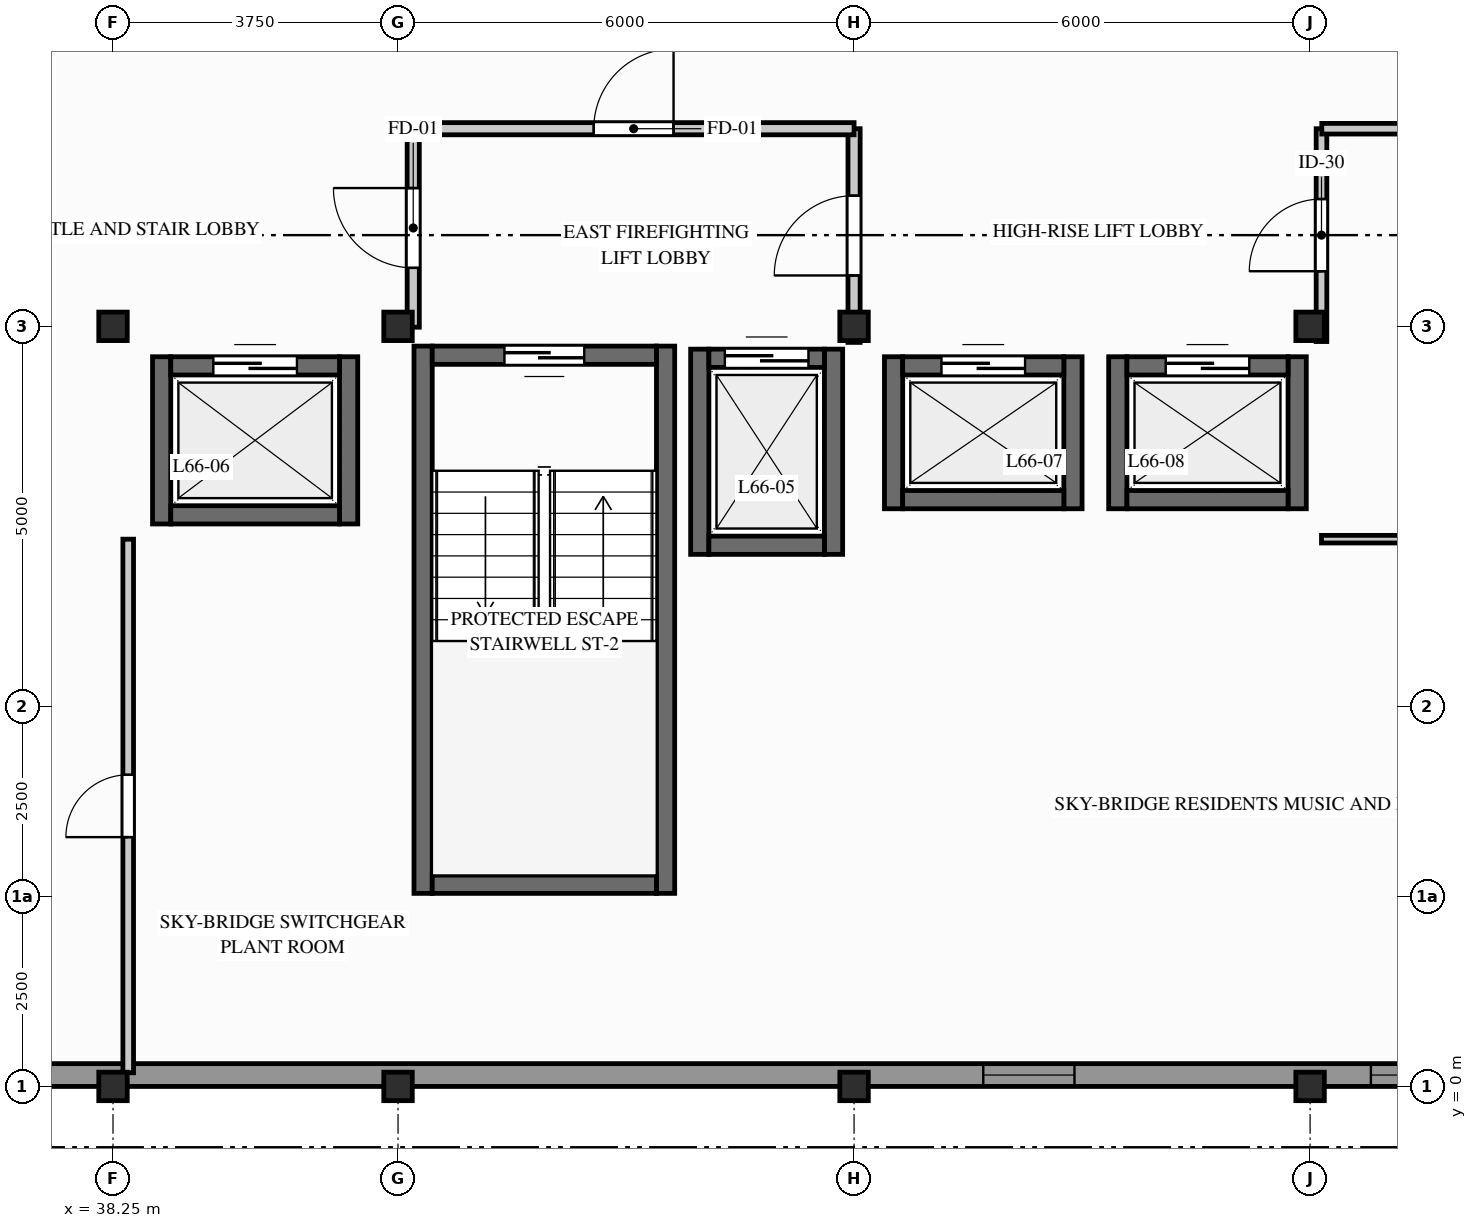
"""IFC4 building model, lengths in metres.
Left out: names, types, materials, properties, quantities, classifications, styles, units other than length and angle.
Written with IfcOpenShell. Run it as: python <this file> out.ifc"""

import sys

from ifc_helpers import new_model, si_unit, direction, frame, frame_2d, origin, origin_2d, place, context, subcontext, project, spatial, rectangle, i_section, extrude, element, fill, save


model = new_model("IFC4")
c1 = context("Model", 3, precision=1e-05, world=origin(), true_north=direction((0.0, 1.0)))
c2 = subcontext(c1, "Body", "Model", "MODEL_VIEW")
j1 = project(units=[si_unit("LENGTHUNIT", "METRE"), si_unit("PLANEANGLEUNIT", "RADIAN")], contexts=[c1])
p1 = place(None, origin())
s1 = spatial("IfcSite", under=j1, at=p1, CompositionType="ELEMENT")
p2 = place(p1, origin())
s2 = spatial("IfcBuilding", under=s1, at=p2, CompositionType="ELEMENT")
p3 = place(p2, frame((0.0, 0.0, 218.0)))
s3 = spatial("IfcBuildingStorey", under=s2, at=p3, CompositionType="ELEMENT", Elevation=218.0)
for number, where, z_axis, x_axis in (
    (1, (38.25, 0.0, 0.0), (0.0, 0.0, 1.0), (1.0, 0.0, 0.0)),
    (2, (38.25, 10.0, 0.0), (0.0, 0.0, 1.0), (1.0, 0.0, 0.0)),
    (3, (42.0, 0.0, 0.0), (0.0, 0.0, 1.0), (1.0, 0.0, 0.0)),
    (4, (42.0, 10.0, 0.0), (0.0, 0.0, 1.0), (1.0, 0.0, 0.0)),
    (5, (48.0, 0.0, 0.0), (0.0, 0.0, 1.0), (1.0, 0.0, 0.0)),
    (6, (48.0, 10.0, 0.0), (0.0, 0.0, 1.0), (1.0, 0.0, 0.0)),
    (7, (54.0, 0.0, 0.0), (0.0, 0.0, 1.0), (1.0, 0.0, 0.0)),
    (8, (54.0, 10.0, 0.0), (0.0, 0.0, 1.0), (1.0, 0.0, 0.0)),
):
    element("IfcColumn", number, at=place(p3, frame(where, z_axis=z_axis, x_axis=x_axis)), inside=s3, PredefinedType="COLUMN", context=c2, shape_type="SweptSolid", body=[
        extrude(i_section(OverallWidth=0.375, OverallDepth=0.375, WebThickness=0.017, FlangeThickness=0.027, FilletRadius=0.015, at=origin_2d()), origin(), (0.0, 0.0, 1.0), 3.1),
    ])
p4 = place(p3, frame((2.5, 0.15, 0.0), z_axis=(0.0, 0.0, 1.0), x_axis=(1.0, 0.0, 0.0)))
e9 = element("IfcWall", 9, at=p4, inside=s3, PredefinedType="STANDARD", context=c2, shape_type="SweptSolid", body=[
    extrude(rectangle(XDim=55.0, YDim=0.3, at=frame_2d((27.5, 0.0))), origin(), (0.0, 0.0, 1.0), 2.332),
])
p5 = place(p4, frame((1.0, 0.0, 0.312)))
e10 = element("IfcOpeningElement", 10, at=p5, cuts=e9, PredefinedType="OPENING", context=c2, shape_type="SweptSolid", body=[
    extrude(rectangle(XDim=1.5, YDim=1.8, at=frame_2d((0.75, 0.9))), frame((0.0, 0.16, 0.0), z_axis=(0.0, -1.0, 0.0), x_axis=(1.0, 0.0, 0.0)), (0.0, 0.0, 1.0), 0.32),
])
p6 = place(p4, frame((24.5, 0.0, 1.15)))
e11 = element("IfcOpeningElement", 11, at=p6, cuts=e9, PredefinedType="OPENING", context=c2, shape_type="SweptSolid", body=[
    extrude(rectangle(XDim=0.9, YDim=0.9, at=frame_2d((0.45, 0.45))), frame((0.0, 0.16, 0.0), z_axis=(0.0, -1.0, 0.0), x_axis=(1.0, 0.0, 0.0)), (0.0, 0.0, 1.0), 0.32),
])
p7 = place(p4, frame((47.2, 0.0, 0.512)))
e12 = element("IfcOpeningElement", 12, at=p7, cuts=e9, PredefinedType="OPENING", context=c2, shape_type="SweptSolid", body=[
    extrude(rectangle(XDim=1.2, YDim=1.6, at=frame_2d((0.6, 0.8))), frame((0.0, 0.16, 0.0), z_axis=(0.0, -1.0, 0.0), x_axis=(1.0, 0.0, 0.0)), (0.0, 0.0, 1.0), 0.32),
])
p8 = place(p4, frame((52.3, 0.0, 0.512)))
e13 = element("IfcOpeningElement", 13, at=p8, cuts=e9, PredefinedType="OPENING", context=c2, shape_type="SweptSolid", body=[
    extrude(rectangle(XDim=1.2, YDim=1.6, at=frame_2d((0.6, 0.8))), frame((0.0, 0.16, 0.0), z_axis=(0.0, -1.0, 0.0), x_axis=(1.0, 0.0, 0.0)), (0.0, 0.0, 1.0), 0.32),
])
for number, where, z_axis, x_axis in (
    (14, (42.33, 2.54, 0.0), (0.0, 0.0, 1.0), (0.0, 1.0, 0.0)),
    (15, (45.52, 2.54, 0.0), (0.0, 0.0, 1.0), (0.0, 1.0, 0.0)),
):
    element("IfcWall", number, at=place(p3, frame(where, z_axis=z_axis, x_axis=x_axis)), inside=s3, PredefinedType="SHEAR", context=c2, shape_type="SweptSolid", body=[
        extrude(rectangle(XDim=7.2, YDim=0.24, at=frame_2d((3.6, 0.0))), origin(), (0.0, 0.0, 1.0), 2.89),
    ])
p9 = place(p3, frame((42.45, 2.66, 0.0), z_axis=(0.0, 0.0, 1.0), x_axis=(1.0, 0.0, 0.0)))
e16 = element("IfcWall", 16, at=p9, inside=s3, PredefinedType="SHEAR", context=c2, shape_type="SweptSolid", body=[
    extrude(rectangle(XDim=2.95, YDim=0.24, at=frame_2d((1.475, 0.0))), origin(), (0.0, 0.0, 1.0), 2.89),
])
p10 = place(p3, frame((45.4, 9.62, 0.0), z_axis=(0.0, 0.0, 1.0), x_axis=(-1.0, 0.0, 0.0)))
e17 = element("IfcWall", 17, at=p10, inside=s3, PredefinedType="SHEAR", context=c2, shape_type="SweptSolid", body=[
    extrude(rectangle(XDim=2.95, YDim=0.24, at=frame_2d((1.475, 0.0))), origin(), (0.0, 0.0, 1.0), 2.89),
])
p11 = place(p10, frame((0.95, 0.0, 0.0)))
e18 = element("IfcOpeningElement", 18, at=p11, cuts=e17, PredefinedType="OPENING", context=c2, shape_type="SweptSolid", body=[
    extrude(rectangle(XDim=1.05, YDim=2.06, at=frame_2d((0.525, 1.03))), frame((0.0, 0.13, 0.0), z_axis=(0.0, -1.0, 0.0), x_axis=(1.0, 0.0, 0.0)), (0.0, 0.0, 1.0), 0.26),
])
for number, where, z_axis, x_axis in (
    (19, (45.97, 7.0, 0.0), (0.0, 0.0, 1.0), (0.0, 1.0, 0.0)),
    (20, (47.73, 7.0, 0.0), (0.0, 0.0, 1.0), (0.0, 1.0, 0.0)),
):
    element("IfcWall", number, at=place(p3, frame(where, z_axis=z_axis, x_axis=x_axis)), inside=s3, PredefinedType="SHEAR", context=c2, shape_type="SweptSolid", body=[
        extrude(rectangle(XDim=2.7, YDim=0.24, at=frame_2d((1.35, 0.0))), origin(), (0.0, 0.0, 1.0), 2.89),
    ])
p12 = place(p3, frame((46.09, 7.12, 0.0), z_axis=(0.0, 0.0, 1.0), x_axis=(1.0, 0.0, 0.0)))
e21 = element("IfcWall", 21, at=p12, inside=s3, PredefinedType="SHEAR", context=c2, shape_type="SweptSolid", body=[
    extrude(rectangle(XDim=1.52, YDim=0.24, at=frame_2d((0.76, 0.0))), origin(), (0.0, 0.0, 1.0), 2.89),
])
p13 = place(p3, frame((46.09, 9.58, 0.0), z_axis=(0.0, 0.0, 1.0), x_axis=(1.0, 0.0, 0.0)))
e22 = element("IfcWall", 22, at=p13, inside=s3, PredefinedType="SHEAR", context=c2, shape_type="SweptSolid", body=[
    extrude(rectangle(XDim=1.52, YDim=0.24, at=frame_2d((0.76, 0.0))), origin(), (0.0, 0.0, 1.0), 2.89),
])
p14 = place(p13, frame((0.21, 0.0, 0.0)))
e23 = element("IfcOpeningElement", 23, at=p14, cuts=e22, PredefinedType="OPENING", context=c2, shape_type="SweptSolid", body=[
    extrude(rectangle(XDim=1.1, YDim=2.06, at=frame_2d((0.55, 1.03))), frame((0.0, 0.13, 0.0), z_axis=(0.0, -1.0, 0.0), x_axis=(1.0, 0.0, 0.0)), (0.0, 0.0, 1.0), 0.26),
])
for number, where, z_axis, x_axis in (
    (24, (38.89, 7.4, 0.0), (0.0, 0.0, 1.0), (0.0, 1.0, 0.0)),
    (25, (41.35, 7.4, 0.0), (0.0, 0.0, 1.0), (0.0, 1.0, 0.0)),
):
    element("IfcWall", number, at=place(p3, frame(where, z_axis=z_axis, x_axis=x_axis)), inside=s3, PredefinedType="SHEAR", context=c2, shape_type="SweptSolid", body=[
        extrude(rectangle(XDim=2.2, YDim=0.24, at=frame_2d((1.1, 0.0))), origin(), (0.0, 0.0, 1.0), 2.89),
    ])
p15 = place(p3, frame((39.01, 7.52, 0.0), z_axis=(0.0, 0.0, 1.0), x_axis=(1.0, 0.0, 0.0)))
e26 = element("IfcWall", 26, at=p15, inside=s3, PredefinedType="SHEAR", context=c2, shape_type="SweptSolid", body=[
    extrude(rectangle(XDim=2.22, YDim=0.24, at=frame_2d((1.11, 0.0))), origin(), (0.0, 0.0, 1.0), 2.89),
])
p16 = place(p3, frame((39.01, 9.48, 0.0), z_axis=(0.0, 0.0, 1.0), x_axis=(1.0, 0.0, 0.0)))
e27 = element("IfcWall", 27, at=p16, inside=s3, PredefinedType="SHEAR", context=c2, shape_type="SweptSolid", body=[
    extrude(rectangle(XDim=2.22, YDim=0.24, at=frame_2d((1.11, 0.0))), origin(), (0.0, 0.0, 1.0), 2.89),
])
p17 = place(p16, frame((0.56, 0.0, 0.0)))
e28 = element("IfcOpeningElement", 28, at=p17, cuts=e27, PredefinedType="OPENING", context=c2, shape_type="SweptSolid", body=[
    extrude(rectangle(XDim=1.1, YDim=2.06, at=frame_2d((0.55, 1.03))), frame((0.0, 0.13, 0.0), z_axis=(0.0, -1.0, 0.0), x_axis=(1.0, 0.0, 0.0)), (0.0, 0.0, 1.0), 0.26),
])
for number, where, z_axis, x_axis in (
    (29, (48.52, 7.6, 0.0), (0.0, 0.0, 1.0), (0.0, 1.0, 0.0)),
    (30, (50.88, 7.6, 0.0), (0.0, 0.0, 1.0), (0.0, 1.0, 0.0)),
):
    element("IfcWall", number, at=place(p3, frame(where, z_axis=z_axis, x_axis=x_axis)), inside=s3, PredefinedType="SHEAR", context=c2, shape_type="SweptSolid", body=[
        extrude(rectangle(XDim=2.0, YDim=0.24, at=frame_2d((1.0, 0.0))), origin(), (0.0, 0.0, 1.0), 2.89),
    ])
p18 = place(p3, frame((48.64, 7.72, 0.0), z_axis=(0.0, 0.0, 1.0), x_axis=(1.0, 0.0, 0.0)))
e31 = element("IfcWall", 31, at=p18, inside=s3, PredefinedType="SHEAR", context=c2, shape_type="SweptSolid", body=[
    extrude(rectangle(XDim=2.12, YDim=0.24, at=frame_2d((1.06, 0.0))), origin(), (0.0, 0.0, 1.0), 2.89),
])
p19 = place(p3, frame((48.64, 9.48, 0.0), z_axis=(0.0, 0.0, 1.0), x_axis=(1.0, 0.0, 0.0)))
e32 = element("IfcWall", 32, at=p19, inside=s3, PredefinedType="SHEAR", context=c2, shape_type="SweptSolid", body=[
    extrude(rectangle(XDim=2.12, YDim=0.24, at=frame_2d((1.06, 0.0))), origin(), (0.0, 0.0, 1.0), 2.89),
])
p20 = place(p19, frame((0.51, 0.0, 0.0)))
e33 = element("IfcOpeningElement", 33, at=p20, cuts=e32, PredefinedType="OPENING", context=c2, shape_type="SweptSolid", body=[
    extrude(rectangle(XDim=1.1, YDim=2.06, at=frame_2d((0.55, 1.03))), frame((0.0, 0.13, 0.0), z_axis=(0.0, -1.0, 0.0), x_axis=(1.0, 0.0, 0.0)), (0.0, 0.0, 1.0), 0.26),
])
for number, where, z_axis, x_axis in (
    (34, (51.47, 7.6, 0.0), (0.0, 0.0, 1.0), (0.0, 1.0, 0.0)),
    (35, (53.83, 7.6, 0.0), (0.0, 0.0, 1.0), (0.0, 1.0, 0.0)),
):
    element("IfcWall", number, at=place(p3, frame(where, z_axis=z_axis, x_axis=x_axis)), inside=s3, PredefinedType="SHEAR", context=c2, shape_type="SweptSolid", body=[
        extrude(rectangle(XDim=2.0, YDim=0.24, at=frame_2d((1.0, 0.0))), origin(), (0.0, 0.0, 1.0), 2.89),
    ])
p21 = place(p3, frame((51.59, 7.72, 0.0), z_axis=(0.0, 0.0, 1.0), x_axis=(1.0, 0.0, 0.0)))
e36 = element("IfcWall", 36, at=p21, inside=s3, PredefinedType="SHEAR", context=c2, shape_type="SweptSolid", body=[
    extrude(rectangle(XDim=2.12, YDim=0.24, at=frame_2d((1.06, 0.0))), origin(), (0.0, 0.0, 1.0), 2.89),
])
p22 = place(p3, frame((51.59, 9.48, 0.0), z_axis=(0.0, 0.0, 1.0), x_axis=(1.0, 0.0, 0.0)))
e37 = element("IfcWall", 37, at=p22, inside=s3, PredefinedType="SHEAR", context=c2, shape_type="SweptSolid", body=[
    extrude(rectangle(XDim=2.12, YDim=0.24, at=frame_2d((1.06, 0.0))), origin(), (0.0, 0.0, 1.0), 2.89),
])
p23 = place(p22, frame((0.51, 0.0, 0.0)))
e38 = element("IfcOpeningElement", 38, at=p23, cuts=e37, PredefinedType="OPENING", context=c2, shape_type="SweptSolid", body=[
    extrude(rectangle(XDim=1.1, YDim=2.06, at=frame_2d((0.55, 1.03))), frame((0.0, 0.13, 0.0), z_axis=(0.0, -1.0, 0.0), x_axis=(1.0, 0.0, 0.0)), (0.0, 0.0, 1.0), 0.26),
])
p24 = place(p3, frame((38.45, 0.18, 0.0), z_axis=(0.0, 0.0, 1.0), x_axis=(0.0, 1.0, 0.0)))
e39 = element("IfcWall", 39, at=p24, inside=s3, PredefinedType="PARTITIONING", context=c2, shape_type="SweptSolid", body=[
    extrude(rectangle(XDim=7.02, YDim=0.14, at=frame_2d((3.51, 0.0))), origin(), (0.0, 0.0, 1.0), 2.325),
])
p25 = place(p24, frame((3.1, 0.0, 0.0)))
e40 = element("IfcOpeningElement", 40, at=p25, cuts=e39, PredefinedType="OPENING", context=c2, shape_type="SweptSolid", body=[
    extrude(rectangle(XDim=0.82, YDim=2.02, at=frame_2d((0.41, 1.01))), frame((0.0, 0.08, 0.0), z_axis=(0.0, -1.0, 0.0), x_axis=(1.0, 0.0, 0.0)), (0.0, 0.0, 1.0), 0.16),
])
p26 = place(p3, frame((42.2, 9.989, 0.0), z_axis=(0.0, 0.0, 1.0), x_axis=(0.0, 1.0, 0.0)))
e41 = element("IfcWall", 41, at=p26, inside=s3, PredefinedType="PARTITIONING", context=c2, shape_type="SweptSolid", body=[
    extrude(rectangle(XDim=2.611, YDim=0.16, at=frame_2d((1.306, 0.0))), origin(), (0.0, 0.0, 1.0), 2.325),
])
p27 = place(p26, frame((0.781, 0.0, 0.0)))
e42 = element("IfcOpeningElement", 42, at=p27, cuts=e41, PredefinedType="OPENING", context=c2, shape_type="SweptSolid", body=[
    extrude(rectangle(XDim=1.05, YDim=2.06, at=frame_2d((0.525, 1.03))), frame((0.0, 0.09, 0.0), z_axis=(0.0, -1.0, 0.0), x_axis=(1.0, 0.0, 0.0)), (0.0, 0.0, 1.0), 0.18),
])
p28 = place(p3, frame((48.0, 9.789, 0.0), z_axis=(0.0, 0.0, 1.0), x_axis=(0.0, 1.0, 0.0)))
e43 = element("IfcWall", 43, at=p28, inside=s3, PredefinedType="PARTITIONING", context=c2, shape_type="SweptSolid", body=[
    extrude(rectangle(XDim=2.811, YDim=0.16, at=frame_2d((1.406, 0.0))), origin(), (0.0, 0.0, 1.0), 2.325),
])
p29 = place(p28, frame((0.881, 0.0, 0.0)))
e44 = element("IfcOpeningElement", 44, at=p29, cuts=e43, PredefinedType="OPENING", context=c2, shape_type="SweptSolid", body=[
    extrude(rectangle(XDim=1.05, YDim=2.06, at=frame_2d((0.525, 1.03))), frame((0.0, 0.09, 0.0), z_axis=(0.0, -1.0, 0.0), x_axis=(1.0, 0.0, 0.0)), (0.0, 0.0, 1.0), 0.18),
])
p30 = place(p3, frame((42.2, 12.6, 0.0), z_axis=(0.0, 0.0, 1.0), x_axis=(1.0, 0.0, 0.0)))
e45 = element("IfcWall", 45, at=p30, inside=s3, PredefinedType="PARTITIONING", context=c2, shape_type="SweptSolid", body=[
    extrude(rectangle(XDim=5.8, YDim=0.16, at=frame_2d((2.9, 0.0))), origin(), (0.0, 0.0, 1.0), 2.325),
])
p31 = place(p30, frame((2.375, 0.0, 0.0)))
e46 = element("IfcOpeningElement", 46, at=p31, cuts=e45, PredefinedType="OPENING", context=c2, shape_type="SweptSolid", body=[
    extrude(rectangle(XDim=1.05, YDim=2.06, at=frame_2d((0.525, 1.03))), frame((0.0, 0.09, 0.0), z_axis=(0.0, -1.0, 0.0), x_axis=(1.0, 0.0, 0.0)), (0.0, 0.0, 1.0), 0.18),
])
p32 = place(p3, frame((54.15, 9.8, 0.0), z_axis=(0.0, 0.0, 1.0), x_axis=(0.0, 1.0, 0.0)))
e47 = element("IfcWall", 47, at=p32, inside=s3, PredefinedType="PARTITIONING", context=c2, shape_type="SweptSolid", body=[
    extrude(rectangle(XDim=2.8, YDim=0.14, at=frame_2d((1.4, 0.0))), origin(), (0.0, 0.0, 1.0), 2.325),
])
p33 = place(p32, frame((0.925, 0.0, 0.0)))
e48 = element("IfcOpeningElement", 48, at=p33, cuts=e47, PredefinedType="OPENING", context=c2, shape_type="SweptSolid", body=[
    extrude(rectangle(XDim=0.95, YDim=2.05, at=frame_2d((0.475, 1.025))), frame((0.0, 0.08, 0.0), z_axis=(0.0, -1.0, 0.0), x_axis=(1.0, 0.0, 0.0)), (0.0, 0.0, 1.0), 0.16),
])
p34 = place(p3, frame((54.154, 12.6, 0.0), z_axis=(0.0, 0.0, 1.0), x_axis=(1.0, 0.0, 0.0)))
e49 = element("IfcWall", 49, at=p34, inside=s3, PredefinedType="PARTITIONING", context=c2, shape_type="SweptSolid", body=[
    extrude(rectangle(XDim=3.046, YDim=0.14, at=frame_2d((1.523, 0.0))), origin(), (0.0, 0.0, 1.0), 2.89),
])
p35 = place(p3, frame((54.15, 7.2, 0.0), z_axis=(0.0, 0.0, 1.0), x_axis=(1.0, 0.0, 0.0)))
e50 = element("IfcWall", 50, at=p35, inside=s3, PredefinedType="PARTITIONING", context=c2, shape_type="SweptSolid", body=[
    extrude(rectangle(XDim=3.05, YDim=0.1, at=frame_2d((1.525, 0.0))), origin(), (0.0, 0.0, 1.0), 2.89),
])
p36 = place(p7, origin())
e51 = element("IfcWindow", 51, at=p36, inside=s3, PartitioningType="SINGLE_PANEL", PredefinedType="WINDOW", context=c2, shape_type="SweptSolid", body=[
    extrude(rectangle(XDim=1.2, YDim=1.6, at=frame_2d((0.6, 0.8))), frame((0.0, 0.03, 0.0), z_axis=(0.0, -1.0, 0.0), x_axis=(1.0, 0.0, 0.0)), (0.0, 0.0, 1.0), 0.06),
])
fill(e12, e51)
p37 = place(p8, origin())
e52 = element("IfcWindow", 52, at=p37, inside=s3, PartitioningType="SINGLE_PANEL", PredefinedType="WINDOW", context=c2, shape_type="SweptSolid", body=[
    extrude(rectangle(XDim=1.2, YDim=1.6, at=frame_2d((0.6, 0.8))), frame((0.0, 0.03, 0.0), z_axis=(0.0, -1.0, 0.0), x_axis=(1.0, 0.0, 0.0)), (0.0, 0.0, 1.0), 0.06),
])
fill(e13, e52)
p38 = place(p11, origin())
e53 = element("IfcDoor", 53, at=p38, inside=s3, OperationType="SINGLE_SWING_LEFT", PredefinedType="DOOR", context=c2, shape_type="SweptSolid", body=[
    extrude(rectangle(XDim=1.05, YDim=2.06, at=frame_2d((0.525, 1.03))), frame((0.0, 0.025, 0.0), z_axis=(0.0, -1.0, 0.0), x_axis=(1.0, 0.0, 0.0)), (0.0, 0.0, 1.0), 0.05),
])
fill(e18, e53)
p39 = place(p14, origin())
e54 = element("IfcDoor", 54, at=p39, inside=s3, OperationType="SLIDING_TO_LEFT", PredefinedType="DOOR", context=c2, shape_type="SweptSolid", body=[
    extrude(rectangle(XDim=1.1, YDim=2.06, at=frame_2d((0.55, 1.03))), frame((0.0, 0.025, 0.0), z_axis=(0.0, -1.0, 0.0), x_axis=(1.0, 0.0, 0.0)), (0.0, 0.0, 1.0), 0.05),
])
fill(e23, e54)
p40 = place(p17, origin())
e55 = element("IfcDoor", 55, at=p40, inside=s3, OperationType="SLIDING_TO_RIGHT", PredefinedType="DOOR", context=c2, shape_type="SweptSolid", body=[
    extrude(rectangle(XDim=1.1, YDim=2.06, at=frame_2d((0.55, 1.03))), frame((0.0, 0.025, 0.0), z_axis=(0.0, -1.0, 0.0), x_axis=(1.0, 0.0, 0.0)), (0.0, 0.0, 1.0), 0.05),
])
fill(e28, e55)
p41 = place(p20, origin())
e56 = element("IfcDoor", 56, at=p41, inside=s3, OperationType="SLIDING_TO_LEFT", PredefinedType="DOOR", context=c2, shape_type="SweptSolid", body=[
    extrude(rectangle(XDim=1.1, YDim=2.06, at=frame_2d((0.55, 1.03))), frame((0.0, 0.025, 0.0), z_axis=(0.0, -1.0, 0.0), x_axis=(1.0, 0.0, 0.0)), (0.0, 0.0, 1.0), 0.05),
])
fill(e33, e56)
p42 = place(p23, origin())
e57 = element("IfcDoor", 57, at=p42, inside=s3, OperationType="SLIDING_TO_RIGHT", PredefinedType="DOOR", context=c2, shape_type="SweptSolid", body=[
    extrude(rectangle(XDim=1.1, YDim=2.06, at=frame_2d((0.55, 1.03))), frame((0.0, 0.025, 0.0), z_axis=(0.0, -1.0, 0.0), x_axis=(1.0, 0.0, 0.0)), (0.0, 0.0, 1.0), 0.05),
])
fill(e38, e57)
p43 = place(p27, origin())
e58 = element("IfcDoor", 58, at=p43, inside=s3, OperationType="SINGLE_SWING_RIGHT", PredefinedType="DOOR", context=c2, shape_type="SweptSolid", body=[
    extrude(rectangle(XDim=1.05, YDim=2.06, at=frame_2d((0.525, 1.03))), frame((0.0, 0.025, 0.0), z_axis=(0.0, -1.0, 0.0), x_axis=(1.0, 0.0, 0.0)), (0.0, 0.0, 1.0), 0.05),
])
fill(e42, e58)
p44 = place(p29, origin())
e59 = element("IfcDoor", 59, at=p44, inside=s3, OperationType="SINGLE_SWING_LEFT", PredefinedType="DOOR", context=c2, shape_type="SweptSolid", body=[
    extrude(rectangle(XDim=1.05, YDim=2.06, at=frame_2d((0.525, 1.03))), frame((0.0, 0.025, 0.0), z_axis=(0.0, -1.0, 0.0), x_axis=(1.0, 0.0, 0.0)), (0.0, 0.0, 1.0), 0.05),
])
fill(e44, e59)
p45 = place(p31, origin())
e60 = element("IfcDoor", 60, at=p45, inside=s3, OperationType="SINGLE_SWING_RIGHT", PredefinedType="DOOR", context=c2, shape_type="SweptSolid", body=[
    extrude(rectangle(XDim=1.05, YDim=2.06, at=frame_2d((0.525, 1.03))), frame((0.0, 0.025, 0.0), z_axis=(0.0, -1.0, 0.0), x_axis=(1.0, 0.0, 0.0)), (0.0, 0.0, 1.0), 0.05),
])
fill(e46, e60)
p46 = place(p33, origin())
e61 = element("IfcDoor", 61, at=p46, inside=s3, OperationType="SINGLE_SWING_LEFT", PredefinedType="DOOR", context=c2, shape_type="SweptSolid", body=[
    extrude(rectangle(XDim=0.95, YDim=2.05, at=frame_2d((0.475, 1.025))), frame((0.0, 0.025, 0.0), z_axis=(0.0, -1.0, 0.0), x_axis=(1.0, 0.0, 0.0)), (0.0, 0.0, 1.0), 0.05),
])
fill(e48, e61)
p47 = place(p25, origin())
e62 = element("IfcDoor", 62, at=p47, inside=s3, OperationType="SINGLE_SWING_LEFT", PredefinedType="DOOR", context=c2, shape_type="SweptSolid", body=[
    extrude(rectangle(XDim=0.82, YDim=2.02, at=frame_2d((0.41, 1.01))), frame((0.0, 0.025, 0.0), z_axis=(0.0, -1.0, 0.0), x_axis=(1.0, 0.0, 0.0)), (0.0, 0.0, 1.0), 0.05),
])
fill(e40, e62)
save(model, sys.argv[1])
